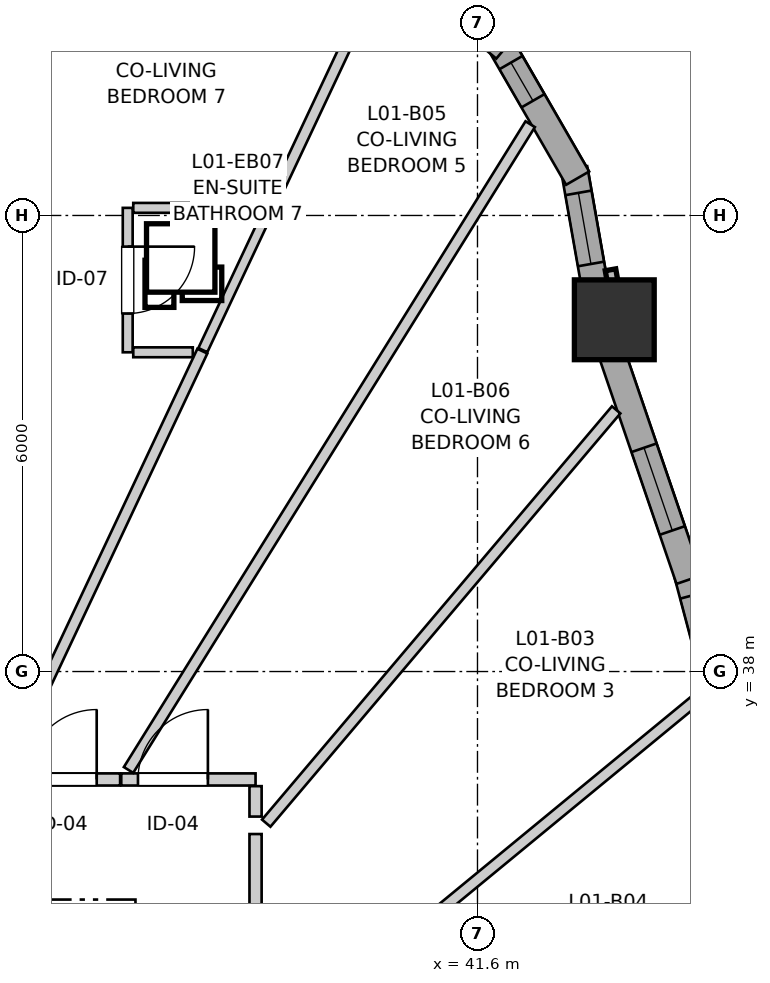
"""IFC4 building model, lengths in metres.
Left out: names, types, materials, properties, quantities, classifications, styles, units other than length and angle.
Written with IfcOpenShell. Run it as: python <this file> out.ifc"""

import sys

from ifc_helpers import new_model, si_unit, direction, frame, frame_2d, origin, origin_2d, place, context, subcontext, project, spatial, rectangle, extrude, source, transform, mapped, element, fill, save


model = new_model("IFC4")
c1 = context("Model", 3, precision=1e-05, world=origin(), true_north=direction((0.0, 1.0)))
c2 = subcontext(c1, "Body", "Model", "MODEL_VIEW")
j1 = project(units=[si_unit("LENGTHUNIT", "METRE"), si_unit("PLANEANGLEUNIT", "RADIAN")], contexts=[c1])
p1 = place(None, origin())
s1 = spatial("IfcSite", under=j1, at=p1, CompositionType="ELEMENT")
p2 = place(p1, origin())
s2 = spatial("IfcBuilding", under=s1, at=p2, CompositionType="ELEMENT")
p3 = place(p2, frame((0.0, 0.0, 7.8)))
s3 = spatial("IfcBuildingStorey", under=s2, at=p3, CompositionType="ELEMENT", Elevation=7.8)
m1 = source(origin(), c2, "Body", "SweptSolid", [
    extrude(rectangle(XDim=1.05, YDim=1.05, at=origin_2d()), origin(), (0.0, 0.0, 1.0), 2.94),
])
p4 = place(p3, frame((43.4, 42.628, 0.0), z_axis=(0.0, 0.0, 1.0), x_axis=(1.0, 0.0, 0.0)))
e1 = element("IfcColumn", 1, at=p4, inside=s3, PredefinedType="COLUMN", context=c2, shape_type="MappedRepresentation", body=[
    mapped(m1, transform((0.0, 0.0, 0.0), x_axis=(1.0, 0.0, 0.0), y_axis=(0.0, 1.0, 0.0), z_axis=(0.0, 0.0, 1.0), scale=1.0)),
])
p5 = place(p3, frame((45.248, 35.951, 0.0), z_axis=(0.0, 0.0, 1.0), x_axis=(-0.25703883136, 0.966401075731, 0.0)))
e2 = element("IfcWall", 2, at=p5, inside=s3, PredefinedType="SOLIDWALL", context=c2, shape_type="SweptSolid", body=[
    extrude(rectangle(XDim=3.459, YDim=0.35, at=frame_2d((1.729, 0.0))), origin(), (0.0, 0.0, 1.0), 2.42),
])
p6 = place(p5, frame((0.329, 0.0, 0.82)))
e3 = element("IfcOpeningElement", 3, at=p6, cuts=e2, PredefinedType="OPENING", context=c2, shape_type="SweptSolid", body=[
    extrude(rectangle(XDim=1.45, YDim=1.25, at=frame_2d((0.725, 0.625))), frame((0.0, 0.185, 0.0), z_axis=(0.0, -1.0, 0.0), x_axis=(1.0, 0.0, 0.0)), (0.0, 0.0, 1.0), 0.37),
])
p7 = place(p5, frame((2.109, 0.0, 0.82)))
e4 = element("IfcOpeningElement", 4, at=p7, cuts=e2, PredefinedType="OPENING", context=c2, shape_type="SweptSolid", body=[
    extrude(rectangle(XDim=1.05, YDim=1.45, at=frame_2d((0.525, 0.725))), frame((0.0, 0.185, 0.0), z_axis=(0.0, -1.0, 0.0), x_axis=(1.0, 0.0, 0.0)), (0.0, 0.0, 1.0), 0.37),
])
p8 = place(p3, frame((44.384, 39.21, 0.0), z_axis=(0.0, 0.0, 1.0), x_axis=(-0.323604561993, 0.946192415663, 0.0)))
e5 = element("IfcWall", 5, at=p8, inside=s3, PredefinedType="SOLIDWALL", context=c2, shape_type="SweptSolid", body=[
    extrude(rectangle(XDim=3.252, YDim=0.35, at=frame_2d((1.626, 0.0))), origin(), (0.0, 0.0, 1.0), 2.42),
])
p9 = place(p8, frame((0.683, 0.0, 0.82)))
e6 = element("IfcOpeningElement", 6, at=p9, cuts=e5, PredefinedType="OPENING", context=c2, shape_type="SweptSolid", body=[
    extrude(rectangle(XDim=1.15, YDim=1.2, at=frame_2d((0.575, 0.6))), frame((0.0, 0.185, 0.0), z_axis=(0.0, -1.0, 0.0), x_axis=(1.0, 0.0, 0.0)), (0.0, 0.0, 1.0), 0.37),
])
p10 = place(p3, frame((43.176, 42.893, 0.0), z_axis=(0.0, 0.0, 1.0), x_axis=(-0.173610462023, 0.984814402553, 0.0)))
e7 = element("IfcWall", 7, at=p10, inside=s3, PredefinedType="SOLIDWALL", context=c2, shape_type="SweptSolid", body=[
    extrude(rectangle(XDim=1.752, YDim=0.35, at=frame_2d((0.876, 0.0))), origin(), (0.0, 0.0, 1.0), 2.42),
])
p11 = place(p10, frame((0.476, 0.0, 0.82)))
e8 = element("IfcOpeningElement", 8, at=p11, cuts=e7, PredefinedType="OPENING", context=c2, shape_type="SweptSolid", body=[
    extrude(rectangle(XDim=0.95, YDim=1.35, at=frame_2d((0.475, 0.675))), frame((0.0, 0.185, 0.0), z_axis=(0.0, -1.0, 0.0), x_axis=(1.0, 0.0, 0.0)), (0.0, 0.0, 1.0), 0.37),
])
p12 = place(p3, frame((42.917, 44.491, 0.0), z_axis=(0.0, 0.0, 1.0), x_axis=(-0.49990781971, 0.866078617559, 0.0)))
e9 = element("IfcWall", 9, at=p12, inside=s3, PredefinedType="SOLIDWALL", context=c2, shape_type="SweptSolid", body=[
    extrude(rectangle(XDim=2.09, YDim=0.35, at=frame_2d((1.045, 0.0))), origin(), (0.0, 0.0, 1.0), 2.42),
])
p13 = place(p12, frame((1.175, 0.0, 0.82)))
e10 = element("IfcOpeningElement", 10, at=p13, cuts=e9, PredefinedType="OPENING", context=c2, shape_type="SweptSolid", body=[
    extrude(rectangle(XDim=0.58, YDim=1.35, at=frame_2d((0.29, 0.675))), frame((0.0, 0.185, 0.0), z_axis=(0.0, -1.0, 0.0), x_axis=(1.0, 0.0, 0.0)), (0.0, 0.0, 1.0), 0.37),
])
p14 = place(p3, frame((41.96, 46.198, 0.0), z_axis=(0.0, 0.0, 1.0), x_axis=(-0.766082082368, 0.642742750308, 0.0)))
e11 = element("IfcWall", 11, at=p14, inside=s3, PredefinedType="SOLIDWALL", context=c2, shape_type="SweptSolid", body=[
    extrude(rectangle(XDim=2.09, YDim=0.35, at=frame_2d((1.045, 0.0))), origin(), (0.0, 0.0, 1.0), 2.42),
])
p15 = place(p14, frame((0.287, 0.0, 0.82)))
e12 = element("IfcOpeningElement", 12, at=p15, cuts=e11, PredefinedType="OPENING", context=c2, shape_type="SweptSolid", body=[
    extrude(rectangle(XDim=1.45, YDim=1.25, at=frame_2d((0.725, 0.625))), frame((0.0, 0.185, 0.0), z_axis=(0.0, -1.0, 0.0), x_axis=(1.0, 0.0, 0.0)), (0.0, 0.0, 1.0), 0.37),
])
p16 = place(p3, frame((38.68, 35.862, 0.0), z_axis=(0.0, 0.0, 1.0), x_axis=(0.0, -1.0, 0.0)))
e13 = element("IfcWall", 13, at=p16, inside=s3, PredefinedType="PARTITIONING", context=c2, shape_type="SweptSolid", body=[
    extrude(rectangle(XDim=3.024, YDim=0.16, at=frame_2d((1.512, 0.0))), origin(), (0.0, 0.0, 1.0), 2.94),
])
p17 = place(p16, frame((1.053, 0.0, 0.0)))
e14 = element("IfcOpeningElement", 14, at=p17, cuts=e13, PredefinedType="OPENING", context=c2, shape_type="SweptSolid", body=[
    extrude(rectangle(XDim=0.92, YDim=2.1, at=frame_2d((0.46, 1.05))), frame((0.0, 0.09, 0.0), z_axis=(0.0, -1.0, 0.0), x_axis=(1.0, 0.0, 0.0)), (0.0, 0.0, 1.0), 0.18),
])
p18 = place(p3, frame((36.998, 44.1, 0.0), z_axis=(0.0, 0.0, 1.0), x_axis=(0.0, -1.0, 0.0)))
e15 = element("IfcWall", 15, at=p18, inside=s3, PredefinedType="PARTITIONING", context=c2, shape_type="SweptSolid", body=[
    extrude(rectangle(XDim=1.9, YDim=0.13, at=frame_2d((0.95, 0.0))), origin(), (0.0, 0.0, 1.0), 2.94),
])
p19 = place(p18, frame((0.51, 0.0, 0.0)))
e16 = element("IfcOpeningElement", 16, at=p19, cuts=e15, PredefinedType="OPENING", context=c2, shape_type="SweptSolid", body=[
    extrude(rectangle(XDim=0.88, YDim=2.05, at=frame_2d((0.44, 1.025))), frame((0.0, 0.075, 0.0), z_axis=(0.0, -1.0, 0.0), x_axis=(1.0, 0.0, 0.0)), (0.0, 0.0, 1.0), 0.15),
])
p20 = place(p3, frame((36.913, 36.58, 0.0), z_axis=(0.0, 0.0, 1.0), x_axis=(1.0, 0.0, 0.0)))
e17 = element("IfcWall", 17, at=p20, inside=s3, PredefinedType="PARTITIONING", context=c2, shape_type="SweptSolid", body=[
    extrude(rectangle(XDim=1.767, YDim=0.16, at=frame_2d((0.883, 0.0))), origin(), (0.0, 0.0, 1.0), 2.94),
])
p21 = place(p20, frame((0.22, 0.0, 0.0)))
e18 = element("IfcOpeningElement", 18, at=p21, cuts=e17, PredefinedType="OPENING", context=c2, shape_type="SweptSolid", body=[
    extrude(rectangle(XDim=0.92, YDim=2.1, at=frame_2d((0.46, 1.05))), frame((0.0, 0.09, 0.0), z_axis=(0.0, -1.0, 0.0), x_axis=(1.0, 0.0, 0.0)), (0.0, 0.0, 1.0), 0.18),
])
p22 = place(p3, frame((35.36, 36.58, 0.0), z_axis=(0.0, 0.0, 1.0), x_axis=(1.0, 0.0, 0.0)))
e19 = element("IfcWall", 19, at=p22, inside=s3, PredefinedType="PARTITIONING", context=c2, shape_type="SweptSolid", body=[
    extrude(rectangle(XDim=1.538, YDim=0.16, at=frame_2d((0.769, 0.0))), origin(), (0.0, 0.0, 1.0), 2.94),
])
p23 = place(p22, frame((0.31, 0.0, 0.0)))
e20 = element("IfcOpeningElement", 20, at=p23, cuts=e19, PredefinedType="OPENING", context=c2, shape_type="SweptSolid", body=[
    extrude(rectangle(XDim=0.92, YDim=2.1, at=frame_2d((0.46, 1.05))), frame((0.0, 0.09, 0.0), z_axis=(0.0, -1.0, 0.0), x_axis=(1.0, 0.0, 0.0)), (0.0, 0.0, 1.0), 0.18),
])
p24 = place(p3, frame((33.169, 36.686, 0.0), z_axis=(0.0, 0.0, 1.0), x_axis=(0.255112522394, 0.966911371801, 0.0)))
e21 = element("IfcWall", 21, at=p24, inside=s3, PredefinedType="PARTITIONING", context=c2, shape_type="SweptSolid", body=[
    extrude(rectangle(XDim=11.469, YDim=0.145, at=frame_2d((5.734, 0.0))), origin(), (0.0, 0.0, 1.0), 2.94),
])
p25 = place(p3, frame((37.009, 36.705, 0.0), z_axis=(0.0, 0.0, 1.0), x_axis=(0.528183829193, 0.849130050451, 0.0)))
e22 = element("IfcWall", 22, at=p25, inside=s3, PredefinedType="PARTITIONING", context=c2, shape_type="SweptSolid", body=[
    extrude(rectangle(XDim=10.005, YDim=0.145, at=frame_2d((5.003, 0.0))), origin(), (0.0, 0.0, 1.0), 2.94),
])
p26 = place(p3, frame((38.812, 32.967, 0.0), z_axis=(0.0, 0.0, 1.0), x_axis=(0.772048037558, 0.635564180633, 0.0)))
e23 = element("IfcWall", 23, at=p26, inside=s3, PredefinedType="PARTITIONING", context=c2, shape_type="SweptSolid", body=[
    extrude(rectangle(XDim=7.477, YDim=0.145, at=frame_2d((3.739, 0.0))), origin(), (0.0, 0.0, 1.0), 2.94),
])
p27 = place(p3, frame((38.821, 36.005, 0.0), z_axis=(0.0, 0.0, 1.0), x_axis=(0.646174151972, 0.76318999294, 0.0)))
e24 = element("IfcWall", 24, at=p27, inside=s3, PredefinedType="PARTITIONING", context=c2, shape_type="SweptSolid", body=[
    extrude(rectangle(XDim=7.125, YDim=0.145, at=frame_2d((3.562, 0.0))), origin(), (0.0, 0.0, 1.0), 2.94),
])
p28 = place(p3, frame((35.385, 36.698, 0.0), z_axis=(0.0, 0.0, 1.0), x_axis=(0.425687116038, 0.904870421242, 0.0)))
e25 = element("IfcWall", 25, at=p28, inside=s3, PredefinedType="PARTITIONING", context=c2, shape_type="SweptSolid", body=[
    extrude(rectangle(XDim=6.097, YDim=0.145, at=frame_2d((3.049, 0.0))), origin(), (0.0, 0.0, 1.0), 2.94),
])
p29 = place(p3, frame((38.783, 43.921, 0.0), z_axis=(0.0, 0.0, 1.0), x_axis=(0.425698730146, 0.904864957412, 0.0)))
e26 = element("IfcWall", 26, at=p29, inside=s3, PredefinedType="PARTITIONING", context=c2, shape_type="SweptSolid", body=[
    extrude(rectangle(XDim=3.708, YDim=0.145, at=frame_2d((1.854, 0.0))), origin(), (0.0, 0.0, 1.0), 2.94),
])
p30 = place(p3, frame((37.987, 42.229, 0.0), z_axis=(0.0, 0.0, 1.0), x_axis=(0.425771690569, 0.904830629184, 0.0)))
e27 = element("IfcWall", 27, at=p30, inside=s3, PredefinedType="PARTITIONING", context=c2, shape_type="SweptSolid", body=[
    extrude(rectangle(XDim=1.855, YDim=0.13, at=frame_2d((0.928, 0.0))), origin(), (0.0, 0.0, 1.0), 2.94),
])
p31 = place(p3, frame((37.071, 44.1, 0.0), z_axis=(0.0, 0.0, 1.0), x_axis=(1.0, 0.0, 0.0)))
e28 = element("IfcWall", 28, at=p31, inside=s3, PredefinedType="PARTITIONING", context=c2, shape_type="SweptSolid", body=[
    extrude(rectangle(XDim=1.608, YDim=0.13, at=frame_2d((0.804, 0.0))), origin(), (0.0, 0.0, 1.0), 2.94),
])
p32 = place(p3, frame((37.071, 42.2, 0.0), z_axis=(0.0, 0.0, 1.0), x_axis=(1.0, 0.0, 0.0)))
e29 = element("IfcWall", 29, at=p32, inside=s3, PredefinedType="PARTITIONING", context=c2, shape_type="SweptSolid", body=[
    extrude(rectangle(XDim=0.783, YDim=0.13, at=frame_2d((0.392, 0.0))), origin(), (0.0, 0.0, 1.0), 2.94),
])
p33 = place(p3, frame((38.68, 36.092, 0.0), z_axis=(0.0, 0.0, 1.0), x_axis=(0.0, 1.0, 0.0)))
e30 = element("IfcWall", 30, at=p33, inside=s3, PredefinedType="PARTITIONING", context=c2, shape_type="SweptSolid", body=[
    extrude(rectangle(XDim=0.4, YDim=0.16, at=frame_2d((0.2, 0.0))), origin(), (0.0, 0.0, 1.0), 2.94),
])
m2 = source(origin(), c2, "Body", "SweptSolid", [
    extrude(rectangle(XDim=1.15, YDim=1.2, at=frame_2d((0.575, 0.6))), frame((0.0, 0.03, 0.0), z_axis=(0.0, -1.0, 0.0), x_axis=(1.0, 0.0, 0.0)), (0.0, 0.0, 1.0), 0.06),
])
p34 = place(p9, origin())
e31 = element("IfcWindow", 31, at=p34, inside=s3, PartitioningType="SINGLE_PANEL", PredefinedType="WINDOW", context=c2, shape_type="MappedRepresentation", body=[
    mapped(m2, transform((0.0, 0.0, 0.0), x_axis=(1.0, 0.0, 0.0), y_axis=(0.0, 1.0, 0.0), z_axis=(0.0, 0.0, 1.0), scale=1.0)),
])
fill(e6, e31)
m3 = source(origin(), c2, "Body", "SweptSolid", [
    extrude(rectangle(XDim=0.95, YDim=1.35, at=frame_2d((0.475, 0.675))), frame((0.0, 0.03, 0.0), z_axis=(0.0, -1.0, 0.0), x_axis=(1.0, 0.0, 0.0)), (0.0, 0.0, 1.0), 0.06),
])
p35 = place(p11, origin())
e32 = element("IfcWindow", 32, at=p35, inside=s3, PartitioningType="SINGLE_PANEL", PredefinedType="WINDOW", context=c2, shape_type="MappedRepresentation", body=[
    mapped(m3, transform((0.0, 0.0, 0.0), x_axis=(1.0, 0.0, 0.0), y_axis=(0.0, 1.0, 0.0), z_axis=(0.0, 0.0, 1.0), scale=1.0)),
])
fill(e8, e32)
m4 = source(origin(), c2, "Body", "SweptSolid", [
    extrude(rectangle(XDim=0.58, YDim=1.35, at=frame_2d((0.29, 0.675))), frame((0.0, 0.03, 0.0), z_axis=(0.0, -1.0, 0.0), x_axis=(1.0, 0.0, 0.0)), (0.0, 0.0, 1.0), 0.06),
])
p36 = place(p13, origin())
e33 = element("IfcWindow", 33, at=p36, inside=s3, PartitioningType="SINGLE_PANEL", PredefinedType="WINDOW", context=c2, shape_type="MappedRepresentation", body=[
    mapped(m4, transform((0.0, 0.0, 0.0), x_axis=(1.0, 0.0, 0.0), y_axis=(0.0, 1.0, 0.0), z_axis=(0.0, 0.0, 1.0), scale=1.0)),
])
fill(e10, e33)
m5 = source(origin(), c2, "Body", "SweptSolid", [
    extrude(rectangle(XDim=0.88, YDim=2.05, at=frame_2d((0.44, 1.025))), frame((0.0, 0.025, 0.0), z_axis=(0.0, -1.0, 0.0), x_axis=(1.0, 0.0, 0.0)), (0.0, 0.0, 1.0), 0.05),
])
p37 = place(p19, origin())
e34 = element("IfcDoor", 34, at=p37, inside=s3, OperationType="SINGLE_SWING_LEFT", PredefinedType="DOOR", context=c2, shape_type="MappedRepresentation", body=[
    mapped(m5, transform((0.0, 0.0, 0.0), x_axis=(1.0, 0.0, 0.0), y_axis=(0.0, 1.0, 0.0), z_axis=(0.0, 0.0, 1.0), scale=1.0)),
])
fill(e16, e34)
m6 = source(origin(), c2, "Body", "SweptSolid", [
    extrude(rectangle(XDim=0.92, YDim=2.1, at=frame_2d((0.46, 1.05))), frame((0.0, 0.025, 0.0), z_axis=(0.0, -1.0, 0.0), x_axis=(1.0, 0.0, 0.0)), (0.0, 0.0, 1.0), 0.05),
])
p38 = place(p21, origin())
e35 = element("IfcDoor", 35, at=p38, inside=s3, OperationType="SINGLE_SWING_RIGHT", PredefinedType="DOOR", context=c2, shape_type="MappedRepresentation", body=[
    mapped(m6, transform((0.0, 0.0, 0.0), x_axis=(1.0, 0.0, 0.0), y_axis=(0.0, 1.0, 0.0), z_axis=(0.0, 0.0, 1.0), scale=1.0)),
])
fill(e18, e35)
p39 = place(p23, origin())
e36 = element("IfcDoor", 36, at=p39, inside=s3, OperationType="SINGLE_SWING_RIGHT", PredefinedType="DOOR", context=c2, shape_type="MappedRepresentation", body=[
    mapped(m6, transform((0.0, 0.0, 0.0), x_axis=(1.0, 0.0, 0.0), y_axis=(0.0, 1.0, 0.0), z_axis=(0.0, 0.0, 1.0), scale=1.0)),
])
fill(e20, e36)
save(model, sys.argv[1])
